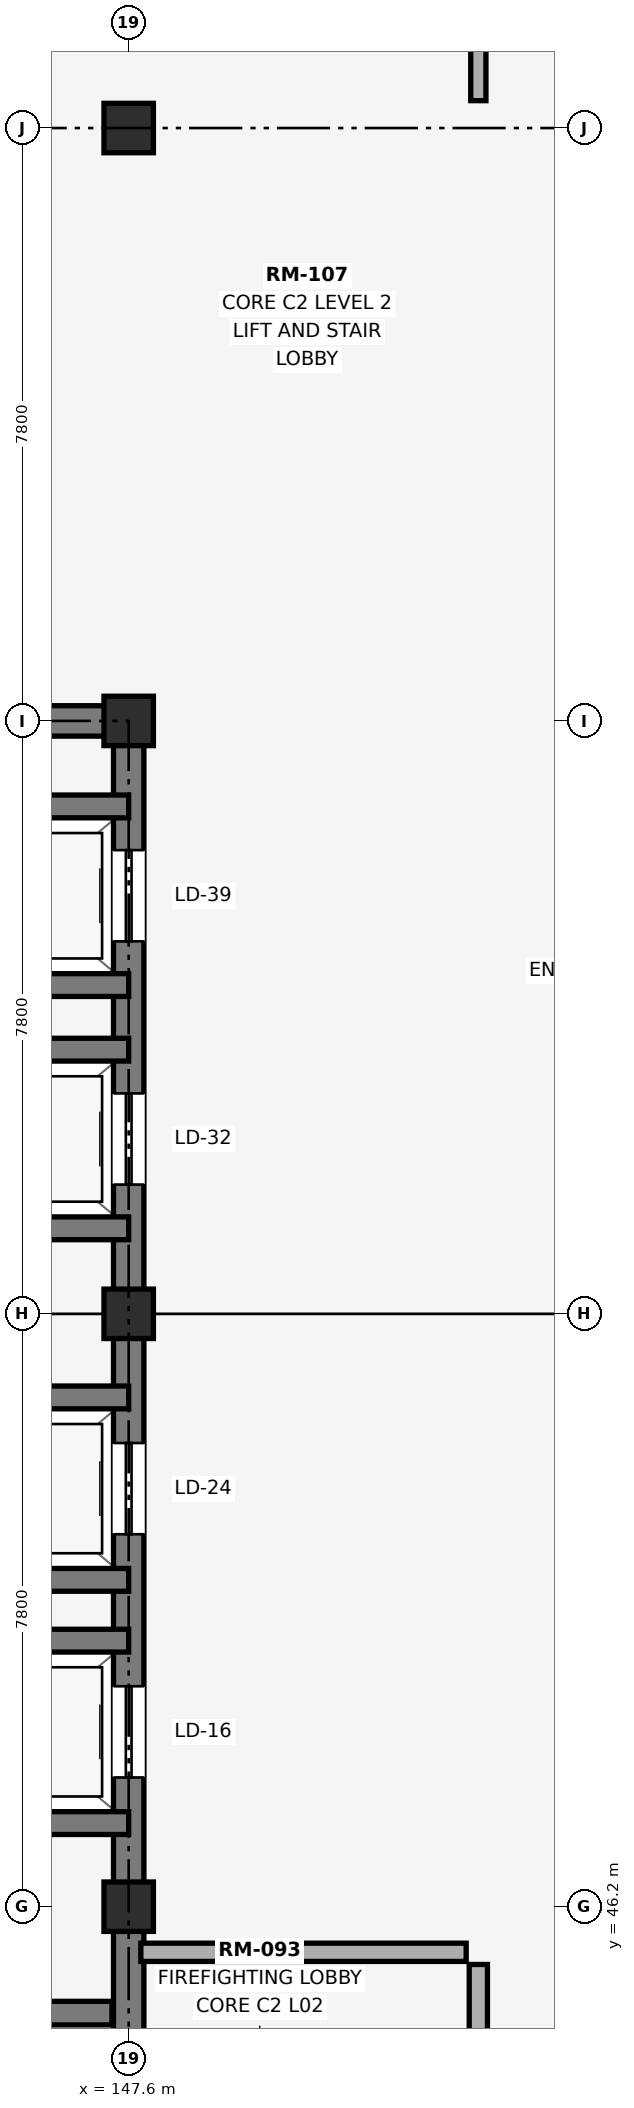
"""IFC4 building model, lengths in metres.
Left out: names, types, materials, properties, quantities, classifications, styles, units other than length and angle.
Written with IfcOpenShell. Run it as: python <this file> out.ifc"""

import sys

from ifc_helpers import new_model, si_unit, direction, frame, frame_2d, origin, origin_2d, place, context, subcontext, project, spatial, rectangle, extrude, element, fill, save


model = new_model("IFC4")
c1 = context("Model", 3, precision=1e-05, world=origin(), true_north=direction((0.0, 1.0)))
c2 = subcontext(c1, "Body", "Model", "MODEL_VIEW")
j1 = project(units=[si_unit("LENGTHUNIT", "METRE"), si_unit("PLANEANGLEUNIT", "RADIAN")], contexts=[c1])
p1 = place(None, origin())
s1 = spatial("IfcSite", under=j1, at=p1, CompositionType="ELEMENT")
p2 = place(p1, origin())
s2 = spatial("IfcBuilding", under=s1, at=p2, CompositionType="ELEMENT")
p3 = place(p2, frame((0.0, 0.0, 10.2)))
s3 = spatial("IfcBuildingStorey", under=s2, at=p3, CompositionType="ELEMENT", Elevation=10.2)
for number, where, z_axis, x_axis in (
    (1, (147.6, 46.2, 0.0), (0.0, 0.0, 1.0), (1.0, 0.0, 0.0)),
    (2, (147.6, 54.0, 0.0), (0.0, 0.0, 1.0), (1.0, 0.0, 0.0)),
    (3, (147.6, 61.8, 0.0), (0.0, 0.0, 1.0), (1.0, 0.0, 0.0)),
    (4, (147.6, 69.6, 0.0), (0.0, 0.0, 1.0), (1.0, 0.0, 0.0)),
):
    element("IfcColumn", number, at=place(p3, frame(where, z_axis=z_axis, x_axis=x_axis)), inside=s3, PredefinedType="COLUMN", context=c2, shape_type="SweptSolid", body=[
        extrude(rectangle(XDim=0.65, YDim=0.65, at=origin_2d()), origin(), (0.0, 0.0, 1.0), 4.8),
    ])
p4 = place(p3, frame((137.8, 61.8, 0.0), z_axis=(0.0, 0.0, 1.0), x_axis=(1.0, 0.0, 0.0)))
e5 = element("IfcWall", 5, at=p4, inside=s3, PredefinedType="SHEAR", context=c2, shape_type="SweptSolid", body=[
    extrude(rectangle(XDim=10.0, YDim=0.4, at=frame_2d((5.0, 0.0))), origin(), (0.0, 0.0, 1.0), 4.8),
])
p5 = place(p3, frame((147.6, 38.6, 0.0), z_axis=(0.0, 0.0, 1.0), x_axis=(0.0, 1.0, 0.0)))
e6 = element("IfcWall", 6, at=p5, inside=s3, PredefinedType="SHEAR", context=c2, shape_type="SweptSolid", body=[
    extrude(rectangle(XDim=23.0, YDim=0.4, at=frame_2d((11.5, 0.0))), origin(), (0.0, 0.0, 1.0), 4.8),
])
p6 = place(p5, frame((9.3, 0.0, 0.0)))
e7 = element("IfcOpeningElement", 7, at=p6, cuts=e6, PredefinedType="OPENING", context=c2, shape_type="SweptSolid", body=[
    extrude(rectangle(XDim=1.2, YDim=2.2, at=frame_2d((0.6, 1.1))), frame((0.0, 0.21, 0.0), z_axis=(0.0, -1.0, 0.0), x_axis=(1.0, 0.0, 0.0)), (0.0, 0.0, 1.0), 0.42),
])
p7 = place(p5, frame((12.5, 0.0, 0.0)))
e8 = element("IfcOpeningElement", 8, at=p7, cuts=e6, PredefinedType="OPENING", context=c2, shape_type="SweptSolid", body=[
    extrude(rectangle(XDim=1.2, YDim=2.2, at=frame_2d((0.6, 1.1))), frame((0.0, 0.21, 0.0), z_axis=(0.0, -1.0, 0.0), x_axis=(1.0, 0.0, 0.0)), (0.0, 0.0, 1.0), 0.42),
])
p8 = place(p5, frame((17.1, 0.0, 0.0)))
e9 = element("IfcOpeningElement", 9, at=p8, cuts=e6, PredefinedType="OPENING", context=c2, shape_type="SweptSolid", body=[
    extrude(rectangle(XDim=1.2, YDim=2.2, at=frame_2d((0.6, 1.1))), frame((0.0, 0.21, 0.0), z_axis=(0.0, -1.0, 0.0), x_axis=(1.0, 0.0, 0.0)), (0.0, 0.0, 1.0), 0.42),
])
p9 = place(p5, frame((20.3, 0.0, 0.0)))
e10 = element("IfcOpeningElement", 10, at=p9, cuts=e6, PredefinedType="OPENING", context=c2, shape_type="SweptSolid", body=[
    extrude(rectangle(XDim=1.2, YDim=2.2, at=frame_2d((0.6, 1.1))), frame((0.0, 0.21, 0.0), z_axis=(0.0, -1.0, 0.0), x_axis=(1.0, 0.0, 0.0)), (0.0, 0.0, 1.0), 0.42),
])
p10 = place(p5, frame((2.4, 0.0, 0.0)))
e11 = element("IfcOpeningElement", 11, at=p10, cuts=e6, PredefinedType="OPENING", context=c2, shape_type="SweptSolid", body=[
    extrude(rectangle(XDim=1.1, YDim=2.2, at=frame_2d((0.55, 1.1))), frame((0.0, 0.21, 0.0), z_axis=(0.0, -1.0, 0.0), x_axis=(1.0, 0.0, 0.0)), (0.0, 0.0, 1.0), 0.42),
])
p11 = place(p3, frame((138.22, 44.8, 0.0), z_axis=(0.0, 0.0, 1.0), x_axis=(1.0, 0.0, 0.0)))
e12 = element("IfcWall", 12, at=p11, inside=s3, PredefinedType="SHEAR", context=c2, shape_type="SweptSolid", body=[
    extrude(rectangle(XDim=9.16, YDim=0.31, at=frame_2d((4.58, 0.0))), origin(), (0.0, 0.0, 1.0), 4.8),
])
for number, where, z_axis, x_axis in (
    (13, (144.75, 47.3, 0.0), (0.0, 0.0, 1.0), (1.0, 0.0, 0.0)),
    (14, (144.75, 49.7, 0.0), (0.0, 0.0, 1.0), (1.0, 0.0, 0.0)),
    (15, (144.75, 50.5, 0.0), (0.0, 0.0, 1.0), (1.0, 0.0, 0.0)),
    (16, (144.75, 52.9, 0.0), (0.0, 0.0, 1.0), (1.0, 0.0, 0.0)),
):
    element("IfcWall", number, at=place(p3, frame(where, z_axis=z_axis, x_axis=x_axis)), inside=s3, PredefinedType="SHEAR", context=c2, shape_type="SweptSolid", body=[
        extrude(rectangle(XDim=2.85, YDim=0.3, at=frame_2d((1.425, 0.0))), origin(), (0.0, 0.0, 1.0), 4.8),
    ])
for number, where, z_axis, x_axis in (
    (17, (144.8, 55.125, 0.0), (0.0, 0.0, 1.0), (1.0, 0.0, 0.0)),
    (18, (144.8, 57.475, 0.0), (0.0, 0.0, 1.0), (1.0, 0.0, 0.0)),
    (19, (144.8, 58.325, 0.0), (0.0, 0.0, 1.0), (1.0, 0.0, 0.0)),
    (20, (144.8, 60.675, 0.0), (0.0, 0.0, 1.0), (1.0, 0.0, 0.0)),
):
    element("IfcWall", number, at=place(p3, frame(where, z_axis=z_axis, x_axis=x_axis)), inside=s3, PredefinedType="SHEAR", context=c2, shape_type="SweptSolid", body=[
        extrude(rectangle(XDim=2.8, YDim=0.3, at=frame_2d((1.4, 0.0))), origin(), (0.0, 0.0, 1.0), 4.8),
    ])
p12 = place(p3, frame((147.76, 45.6, 0.0), z_axis=(0.0, 0.0, 1.0), x_axis=(1.0, 0.0, 0.0)))
e21 = element("IfcWall", 21, at=p12, inside=s3, PredefinedType="PARTITIONING", context=c2, shape_type="SweptSolid", body=[
    extrude(rectangle(XDim=4.28, YDim=0.24, at=frame_2d((2.14, 0.0))), origin(), (0.0, 0.0, 1.0), 4.49),
])
p13 = place(p3, frame((152.2, 38.56, 0.0), z_axis=(0.0, 0.0, 1.0), x_axis=(0.0, 1.0, 0.0)))
e22 = element("IfcWall", 22, at=p13, inside=s3, PredefinedType="PARTITIONING", context=c2, shape_type="SweptSolid", body=[
    extrude(rectangle(XDim=6.88, YDim=0.24, at=frame_2d((3.44, 0.0))), origin(), (0.0, 0.0, 1.0), 4.49),
])
p14 = place(p13, frame((1.9, 0.0, 0.0)))
e23 = element("IfcOpeningElement", 23, at=p14, cuts=e22, PredefinedType="OPENING", context=c2, shape_type="SweptSolid", body=[
    extrude(rectangle(XDim=1.8, YDim=2.3, at=frame_2d((0.9, 1.15))), frame((0.0, 0.13, 0.0), z_axis=(0.0, -1.0, 0.0), x_axis=(1.0, 0.0, 0.0)), (0.0, 0.0, 1.0), 0.26),
])
p15 = place(p3, frame((152.2, 69.96, 0.0), z_axis=(0.0, 0.0, 1.0), x_axis=(0.0, 1.0, 0.0)))
e24 = element("IfcWall", 24, at=p15, inside=s3, PredefinedType="PARTITIONING", context=c2, shape_type="SweptSolid", body=[
    extrude(rectangle(XDim=19.88, YDim=0.2, at=frame_2d((9.94, 0.0))), origin(), (0.0, 0.0, 1.0), 4.49),
])
p16 = place(p15, frame((8.0, 0.0, 0.0)))
e25 = element("IfcOpeningElement", 25, at=p16, cuts=e24, PredefinedType="OPENING", context=c2, shape_type="SweptSolid", body=[
    extrude(rectangle(XDim=0.95, YDim=2.15, at=frame_2d((0.475, 1.075))), frame((0.0, 0.11, 0.0), z_axis=(0.0, -1.0, 0.0), x_axis=(1.0, 0.0, 0.0)), (0.0, 0.0, 1.0), 0.22),
])
p17 = place(p6, origin())
e26 = element("IfcDoor", 26, at=p17, inside=s3, OperationType="SLIDING_TO_RIGHT", PredefinedType="DOOR", context=c2, shape_type="SweptSolid", body=[
    extrude(rectangle(XDim=1.2, YDim=2.2, at=frame_2d((0.6, 1.1))), frame((0.0, 0.025, 0.0), z_axis=(0.0, -1.0, 0.0), x_axis=(1.0, 0.0, 0.0)), (0.0, 0.0, 1.0), 0.05),
])
fill(e7, e26)
p18 = place(p7, origin())
e27 = element("IfcDoor", 27, at=p18, inside=s3, OperationType="SLIDING_TO_RIGHT", PredefinedType="DOOR", context=c2, shape_type="SweptSolid", body=[
    extrude(rectangle(XDim=1.2, YDim=2.2, at=frame_2d((0.6, 1.1))), frame((0.0, 0.025, 0.0), z_axis=(0.0, -1.0, 0.0), x_axis=(1.0, 0.0, 0.0)), (0.0, 0.0, 1.0), 0.05),
])
fill(e8, e27)
p19 = place(p8, origin())
e28 = element("IfcDoor", 28, at=p19, inside=s3, OperationType="SLIDING_TO_RIGHT", PredefinedType="DOOR", context=c2, shape_type="SweptSolid", body=[
    extrude(rectangle(XDim=1.2, YDim=2.2, at=frame_2d((0.6, 1.1))), frame((0.0, 0.025, 0.0), z_axis=(0.0, -1.0, 0.0), x_axis=(1.0, 0.0, 0.0)), (0.0, 0.0, 1.0), 0.05),
])
fill(e9, e28)
p20 = place(p9, origin())
e29 = element("IfcDoor", 29, at=p20, inside=s3, OperationType="SLIDING_TO_LEFT", PredefinedType="DOOR", context=c2, shape_type="SweptSolid", body=[
    extrude(rectangle(XDim=1.2, YDim=2.2, at=frame_2d((0.6, 1.1))), frame((0.0, 0.025, 0.0), z_axis=(0.0, -1.0, 0.0), x_axis=(1.0, 0.0, 0.0)), (0.0, 0.0, 1.0), 0.05),
])
fill(e10, e29)
save(model, sys.argv[1])
